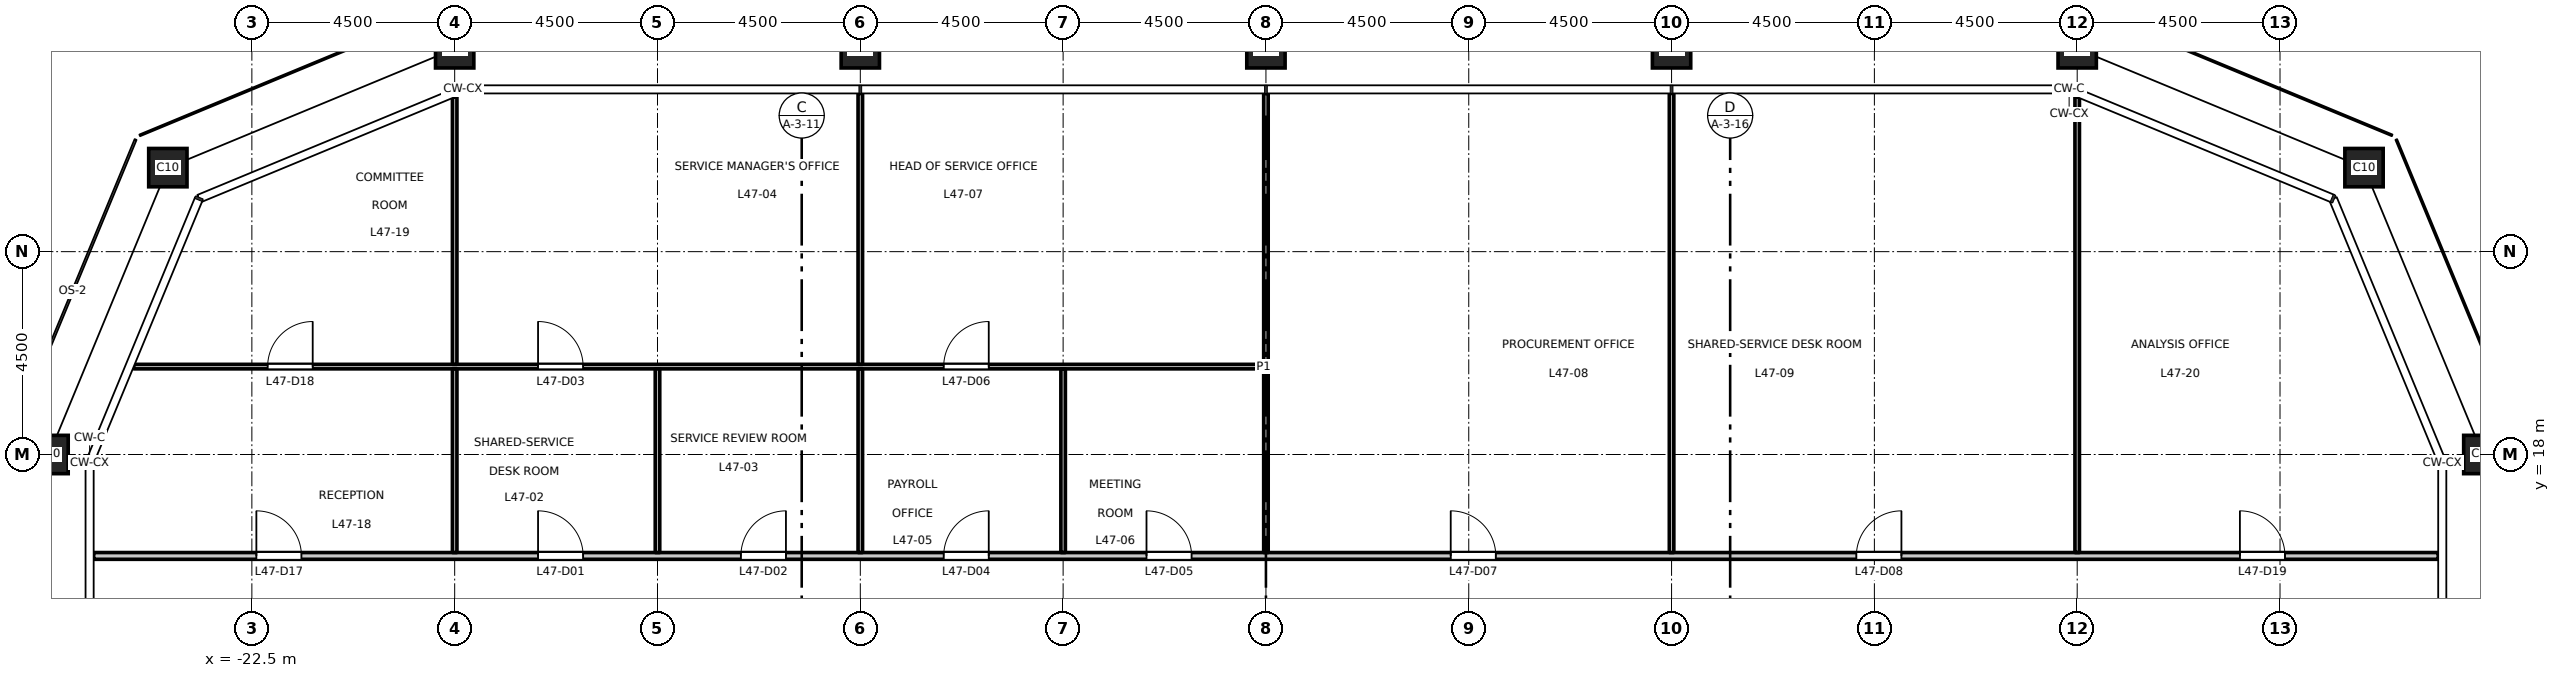
"""IFC4 building model, lengths in metres.
Left out: names, types, materials, properties, quantities, classifications, styles, units other than length and angle.
Written with IfcOpenShell. Run it as: python <this file> out.ifc"""

import sys

from ifc_helpers import new_model, si_unit, direction, frame, frame_2d, origin, origin_2d, place, context, subcontext, project, spatial, rectangle, hollow_rectangle, extrude, element, fill, save


model = new_model("IFC4")
c1 = context("Model", 3, precision=1e-05, world=origin(), true_north=direction((0.0, 1.0)))
c2 = subcontext(c1, "Body", "Model", "MODEL_VIEW")
j1 = project(units=[si_unit("LENGTHUNIT", "METRE"), si_unit("PLANEANGLEUNIT", "RADIAN")], contexts=[c1])
p1 = place(None, origin())
s1 = spatial("IfcSite", under=j1, at=p1, CompositionType="ELEMENT")
p2 = place(p1, origin())
s2 = spatial("IfcBuilding", under=s1, at=p2, CompositionType="ELEMENT")
p3 = place(p2, frame((0.0, 0.0, 219.7)))
s3 = spatial("IfcBuildingStorey", under=s2, at=p3, CompositionType="ELEMENT", Elevation=219.7)
for number, where, z_axis, x_axis in (
    (1, (27.0, 18.0, 0.0), (0.0, 0.0, 1.0), (1.0, 0.0, 0.0)),
    (2, (24.364, 24.364, 0.0), (0.0, 0.0, 1.0), (1.0, 0.0, 0.0)),
    (3, (18.0, 27.0, 0.0), (0.0, 0.0, 1.0), (1.0, 0.0, 0.0)),
    (4, (9.0, 27.0, 0.0), (0.0, 0.0, 1.0), (1.0, 0.0, 0.0)),
    (5, (0.0, 27.0, 0.0), (0.0, 0.0, 1.0), (1.0, 0.0, 0.0)),
    (6, (-9.0, 27.0, 0.0), (0.0, 0.0, 1.0), (1.0, 0.0, 0.0)),
    (7, (-18.0, 27.0, 0.0), (0.0, 0.0, 1.0), (1.0, 0.0, 0.0)),
    (8, (-24.364, 24.364, 0.0), (0.0, 0.0, 1.0), (1.0, 0.0, 0.0)),
    (9, (-27.0, 18.0, 0.0), (0.0, 0.0, 1.0), (1.0, 0.0, 0.0)),
):
    element("IfcColumn", number, at=place(p3, frame(where, z_axis=z_axis, x_axis=x_axis)), inside=s3, PredefinedType="COLUMN", context=c2, shape_type="SweptSolid", body=[
        extrude(hollow_rectangle(XDim=0.85, YDim=0.85, WallThickness=0.05, at=origin_2d()), origin(), (0.0, 0.0, 1.0), 4.5),
    ])
p4 = place(p3, frame((-26.01, 15.75, 0.0), z_axis=(0.0, 0.0, 1.0), x_axis=(1.0, 0.0, 0.0)))
e10 = element("IfcWall", 10, at=p4, inside=s3, PredefinedType="PARTITIONING", context=c2, shape_type="SweptSolid", body=[
    extrude(rectangle(XDim=52.02, YDim=0.15, at=frame_2d((26.01, 0.0))), origin(), (0.0, 0.0, 1.0), 4.35),
])
p5 = place(p4, frame((9.86, 0.0, 0.0)))
e11 = element("IfcOpeningElement", 11, at=p5, cuts=e10, PredefinedType="OPENING", context=c2, shape_type="SweptSolid", body=[
    extrude(rectangle(XDim=1.0, YDim=2.1, at=frame_2d((0.5, 1.05))), frame((0.0, 0.085, 0.0), z_axis=(0.0, -1.0, 0.0), x_axis=(1.0, 0.0, 0.0)), (0.0, 0.0, 1.0), 0.17),
])
p6 = place(p4, frame((14.36, 0.0, 0.0)))
e12 = element("IfcOpeningElement", 12, at=p6, cuts=e10, PredefinedType="OPENING", context=c2, shape_type="SweptSolid", body=[
    extrude(rectangle(XDim=1.0, YDim=2.1, at=frame_2d((0.5, 1.05))), frame((0.0, 0.085, 0.0), z_axis=(0.0, -1.0, 0.0), x_axis=(1.0, 0.0, 0.0)), (0.0, 0.0, 1.0), 0.17),
])
p7 = place(p4, frame((18.86, 0.0, 0.0)))
e13 = element("IfcOpeningElement", 13, at=p7, cuts=e10, PredefinedType="OPENING", context=c2, shape_type="SweptSolid", body=[
    extrude(rectangle(XDim=1.0, YDim=2.1, at=frame_2d((0.5, 1.05))), frame((0.0, 0.085, 0.0), z_axis=(0.0, -1.0, 0.0), x_axis=(1.0, 0.0, 0.0)), (0.0, 0.0, 1.0), 0.17),
])
p8 = place(p4, frame((23.36, 0.0, 0.0)))
e14 = element("IfcOpeningElement", 14, at=p8, cuts=e10, PredefinedType="OPENING", context=c2, shape_type="SweptSolid", body=[
    extrude(rectangle(XDim=1.0, YDim=2.1, at=frame_2d((0.5, 1.05))), frame((0.0, 0.085, 0.0), z_axis=(0.0, -1.0, 0.0), x_axis=(1.0, 0.0, 0.0)), (0.0, 0.0, 1.0), 0.17),
])
p9 = place(p4, frame((30.11, 0.0, 0.0)))
e15 = element("IfcOpeningElement", 15, at=p9, cuts=e10, PredefinedType="OPENING", context=c2, shape_type="SweptSolid", body=[
    extrude(rectangle(XDim=1.0, YDim=2.1, at=frame_2d((0.5, 1.05))), frame((0.0, 0.085, 0.0), z_axis=(0.0, -1.0, 0.0), x_axis=(1.0, 0.0, 0.0)), (0.0, 0.0, 1.0), 0.17),
])
p10 = place(p4, frame((39.11, 0.0, 0.0)))
e16 = element("IfcOpeningElement", 16, at=p10, cuts=e10, PredefinedType="OPENING", context=c2, shape_type="SweptSolid", body=[
    extrude(rectangle(XDim=1.0, YDim=2.1, at=frame_2d((0.5, 1.05))), frame((0.0, 0.085, 0.0), z_axis=(0.0, -1.0, 0.0), x_axis=(1.0, 0.0, 0.0)), (0.0, 0.0, 1.0), 0.17),
])
p11 = place(p4, frame((3.61, 0.0, 0.0)))
e17 = element("IfcOpeningElement", 17, at=p11, cuts=e10, PredefinedType="OPENING", context=c2, shape_type="SweptSolid", body=[
    extrude(rectangle(XDim=1.0, YDim=2.1, at=frame_2d((0.5, 1.05))), frame((0.0, 0.085, 0.0), z_axis=(0.0, -1.0, 0.0), x_axis=(1.0, 0.0, 0.0)), (0.0, 0.0, 1.0), 0.17),
])
p12 = place(p4, frame((47.62, 0.0, 0.0)))
e18 = element("IfcOpeningElement", 18, at=p12, cuts=e10, PredefinedType="OPENING", context=c2, shape_type="SweptSolid", body=[
    extrude(rectangle(XDim=1.0, YDim=2.1, at=frame_2d((0.5, 1.05))), frame((0.0, 0.085, 0.0), z_axis=(0.0, -1.0, 0.0), x_axis=(1.0, 0.0, 0.0)), (0.0, 0.0, 1.0), 0.17),
])
p13 = place(p3, frame((-25.121, 19.95, 0.0), z_axis=(0.0, 0.0, 1.0), x_axis=(1.0, 0.0, 0.0)))
e19 = element("IfcWall", 19, at=p13, inside=s3, PredefinedType="PARTITIONING", context=c2, shape_type="SweptSolid", body=[
    extrude(rectangle(XDim=25.071, YDim=0.1, at=frame_2d((12.536, 0.0))), origin(), (0.0, 0.0, 1.0), 4.35),
])
p14 = place(p13, frame((8.971, 0.0, 0.0)))
e20 = element("IfcOpeningElement", 20, at=p14, cuts=e19, PredefinedType="OPENING", context=c2, shape_type="SweptSolid", body=[
    extrude(rectangle(XDim=1.0, YDim=2.1, at=frame_2d((0.5, 1.05))), frame((0.0, 0.06, 0.0), z_axis=(0.0, -1.0, 0.0), x_axis=(1.0, 0.0, 0.0)), (0.0, 0.0, 1.0), 0.12),
])
p15 = place(p13, frame((17.971, 0.0, 0.0)))
e21 = element("IfcOpeningElement", 21, at=p15, cuts=e19, PredefinedType="OPENING", context=c2, shape_type="SweptSolid", body=[
    extrude(rectangle(XDim=1.0, YDim=2.1, at=frame_2d((0.5, 1.05))), frame((0.0, 0.06, 0.0), z_axis=(0.0, -1.0, 0.0), x_axis=(1.0, 0.0, 0.0)), (0.0, 0.0, 1.0), 0.12),
])
p16 = place(p13, frame((2.971, 0.0, 0.0)))
e22 = element("IfcOpeningElement", 22, at=p16, cuts=e19, PredefinedType="OPENING", context=c2, shape_type="SweptSolid", body=[
    extrude(rectangle(XDim=1.0, YDim=2.1, at=frame_2d((0.5, 1.05))), frame((0.0, 0.06, 0.0), z_axis=(0.0, -1.0, 0.0), x_axis=(1.0, 0.0, 0.0)), (0.0, 0.0, 1.0), 0.12),
])
p17 = place(p3, frame((-18.0, 15.825, 0.0), z_axis=(0.0, 0.0, 1.0), x_axis=(0.0, 1.0, 0.0)))
e23 = element("IfcWall", 23, at=p17, inside=s3, PredefinedType="PARTITIONING", context=c2, shape_type="SweptSolid", body=[
    extrude(rectangle(XDim=4.075, YDim=0.1, at=frame_2d((2.038, 0.0))), origin(), (0.0, 0.0, 1.0), 3.65),
])
p18 = place(p3, frame((-18.0, 20.0, 0.0), z_axis=(0.0, 0.0, 1.0), x_axis=(0.0, 1.0, 0.0)))
e24 = element("IfcWall", 24, at=p18, inside=s3, PredefinedType="PARTITIONING", context=c2, shape_type="SweptSolid", body=[
    extrude(rectangle(XDim=5.928, YDim=0.1, at=frame_2d((2.964, 0.0))), origin(), (0.0, 0.0, 1.0), 3.65),
])
p19 = place(p3, frame((-13.5, 15.825, 0.0), z_axis=(0.0, 0.0, 1.0), x_axis=(0.0, 1.0, 0.0)))
e25 = element("IfcWall", 25, at=p19, inside=s3, PredefinedType="PARTITIONING", context=c2, shape_type="SweptSolid", body=[
    extrude(rectangle(XDim=4.075, YDim=0.1, at=frame_2d((2.038, 0.0))), origin(), (0.0, 0.0, 1.0), 4.35),
])
p20 = place(p3, frame((-9.0, 15.825, 0.0), z_axis=(0.0, 0.0, 1.0), x_axis=(0.0, 1.0, 0.0)))
e26 = element("IfcWall", 26, at=p20, inside=s3, PredefinedType="PARTITIONING", context=c2, shape_type="SweptSolid", body=[
    extrude(rectangle(XDim=4.075, YDim=0.1, at=frame_2d((2.038, 0.0))), origin(), (0.0, 0.0, 1.0), 3.65),
])
p21 = place(p3, frame((-9.0, 20.0, 0.0), z_axis=(0.0, 0.0, 1.0), x_axis=(0.0, 1.0, 0.0)))
e27 = element("IfcWall", 27, at=p21, inside=s3, PredefinedType="PARTITIONING", context=c2, shape_type="SweptSolid", body=[
    extrude(rectangle(XDim=6.01, YDim=0.1, at=frame_2d((3.005, 0.0))), origin(), (0.0, 0.0, 1.0), 3.65),
])
p22 = place(p3, frame((-4.5, 15.825, 0.0), z_axis=(0.0, 0.0, 1.0), x_axis=(0.0, 1.0, 0.0)))
e28 = element("IfcWall", 28, at=p22, inside=s3, PredefinedType="PARTITIONING", context=c2, shape_type="SweptSolid", body=[
    extrude(rectangle(XDim=4.075, YDim=0.1, at=frame_2d((2.038, 0.0))), origin(), (0.0, 0.0, 1.0), 4.35),
])
p23 = place(p3, frame((0.0, 15.825, 0.0), z_axis=(0.0, 0.0, 1.0), x_axis=(0.0, 1.0, 0.0)))
e29 = element("IfcWall", 29, at=p23, inside=s3, PredefinedType="PARTITIONING", context=c2, shape_type="SweptSolid", body=[
    extrude(rectangle(XDim=10.185, YDim=0.1, at=frame_2d((5.093, 0.0))), origin(), (0.0, 0.0, 1.0), 3.55),
])
p24 = place(p3, frame((9.0, 15.825, 0.0), z_axis=(0.0, 0.0, 1.0), x_axis=(0.0, 1.0, 0.0)))
e30 = element("IfcWall", 30, at=p24, inside=s3, PredefinedType="PARTITIONING", context=c2, shape_type="SweptSolid", body=[
    extrude(rectangle(XDim=10.185, YDim=0.1, at=frame_2d((5.093, 0.0))), origin(), (0.0, 0.0, 1.0), 3.65),
])
p25 = place(p3, frame((18.0, 15.825, 0.0), z_axis=(0.0, 0.0, 1.0), x_axis=(0.0, 1.0, 0.0)))
e31 = element("IfcWall", 31, at=p25, inside=s3, PredefinedType="PARTITIONING", context=c2, shape_type="SweptSolid", body=[
    extrude(rectangle(XDim=10.103, YDim=0.1, at=frame_2d((5.052, 0.0))), origin(), (0.0, 0.0, 1.0), 3.65),
])
p26 = place(p5, origin())
e32 = element("IfcDoor", 32, at=p26, inside=s3, OperationType="SINGLE_SWING_LEFT", PredefinedType="DOOR", context=c2, shape_type="SweptSolid", body=[
    extrude(rectangle(XDim=1.0, YDim=2.1, at=frame_2d((0.5, 1.05))), frame((0.0, 0.025, 0.0), z_axis=(0.0, -1.0, 0.0), x_axis=(1.0, 0.0, 0.0)), (0.0, 0.0, 1.0), 0.05),
])
fill(e11, e32)
p27 = place(p6, origin())
e33 = element("IfcDoor", 33, at=p27, inside=s3, OperationType="SINGLE_SWING_RIGHT", PredefinedType="DOOR", context=c2, shape_type="SweptSolid", body=[
    extrude(rectangle(XDim=1.0, YDim=2.1, at=frame_2d((0.5, 1.05))), frame((0.0, 0.025, 0.0), z_axis=(0.0, -1.0, 0.0), x_axis=(1.0, 0.0, 0.0)), (0.0, 0.0, 1.0), 0.05),
])
fill(e12, e33)
p28 = place(p14, origin())
e34 = element("IfcDoor", 34, at=p28, inside=s3, OperationType="SINGLE_SWING_LEFT", PredefinedType="DOOR", context=c2, shape_type="SweptSolid", body=[
    extrude(rectangle(XDim=1.0, YDim=2.1, at=frame_2d((0.5, 1.05))), frame((0.0, 0.025, 0.0), z_axis=(0.0, -1.0, 0.0), x_axis=(1.0, 0.0, 0.0)), (0.0, 0.0, 1.0), 0.05),
])
fill(e20, e34)
p29 = place(p7, origin())
e35 = element("IfcDoor", 35, at=p29, inside=s3, OperationType="SINGLE_SWING_RIGHT", PredefinedType="DOOR", context=c2, shape_type="SweptSolid", body=[
    extrude(rectangle(XDim=1.0, YDim=2.1, at=frame_2d((0.5, 1.05))), frame((0.0, 0.025, 0.0), z_axis=(0.0, -1.0, 0.0), x_axis=(1.0, 0.0, 0.0)), (0.0, 0.0, 1.0), 0.05),
])
fill(e13, e35)
p30 = place(p8, origin())
e36 = element("IfcDoor", 36, at=p30, inside=s3, OperationType="SINGLE_SWING_LEFT", PredefinedType="DOOR", context=c2, shape_type="SweptSolid", body=[
    extrude(rectangle(XDim=1.0, YDim=2.1, at=frame_2d((0.5, 1.05))), frame((0.0, 0.025, 0.0), z_axis=(0.0, -1.0, 0.0), x_axis=(1.0, 0.0, 0.0)), (0.0, 0.0, 1.0), 0.05),
])
fill(e14, e36)
p31 = place(p15, origin())
e37 = element("IfcDoor", 37, at=p31, inside=s3, OperationType="SINGLE_SWING_RIGHT", PredefinedType="DOOR", context=c2, shape_type="SweptSolid", body=[
    extrude(rectangle(XDim=1.0, YDim=2.1, at=frame_2d((0.5, 1.05))), frame((0.0, 0.025, 0.0), z_axis=(0.0, -1.0, 0.0), x_axis=(1.0, 0.0, 0.0)), (0.0, 0.0, 1.0), 0.05),
])
fill(e21, e37)
p32 = place(p9, origin())
e38 = element("IfcDoor", 38, at=p32, inside=s3, OperationType="SINGLE_SWING_LEFT", PredefinedType="DOOR", context=c2, shape_type="SweptSolid", body=[
    extrude(rectangle(XDim=1.0, YDim=2.1, at=frame_2d((0.5, 1.05))), frame((0.0, 0.025, 0.0), z_axis=(0.0, -1.0, 0.0), x_axis=(1.0, 0.0, 0.0)), (0.0, 0.0, 1.0), 0.05),
])
fill(e15, e38)
p33 = place(p10, origin())
e39 = element("IfcDoor", 39, at=p33, inside=s3, OperationType="SINGLE_SWING_RIGHT", PredefinedType="DOOR", context=c2, shape_type="SweptSolid", body=[
    extrude(rectangle(XDim=1.0, YDim=2.1, at=frame_2d((0.5, 1.05))), frame((0.0, 0.025, 0.0), z_axis=(0.0, -1.0, 0.0), x_axis=(1.0, 0.0, 0.0)), (0.0, 0.0, 1.0), 0.05),
])
fill(e16, e39)
p34 = place(p11, origin())
e40 = element("IfcDoor", 40, at=p34, inside=s3, OperationType="SINGLE_SWING_LEFT", PredefinedType="DOOR", context=c2, shape_type="SweptSolid", body=[
    extrude(rectangle(XDim=1.0, YDim=2.1, at=frame_2d((0.5, 1.05))), frame((0.0, 0.025, 0.0), z_axis=(0.0, -1.0, 0.0), x_axis=(1.0, 0.0, 0.0)), (0.0, 0.0, 1.0), 0.05),
])
fill(e17, e40)
p35 = place(p16, origin())
e41 = element("IfcDoor", 41, at=p35, inside=s3, OperationType="SINGLE_SWING_RIGHT", PredefinedType="DOOR", context=c2, shape_type="SweptSolid", body=[
    extrude(rectangle(XDim=1.0, YDim=2.1, at=frame_2d((0.5, 1.05))), frame((0.0, 0.025, 0.0), z_axis=(0.0, -1.0, 0.0), x_axis=(1.0, 0.0, 0.0)), (0.0, 0.0, 1.0), 0.05),
])
fill(e22, e41)
p36 = place(p12, origin())
e42 = element("IfcDoor", 42, at=p36, inside=s3, OperationType="SINGLE_SWING_LEFT", PredefinedType="DOOR", context=c2, shape_type="SweptSolid", body=[
    extrude(rectangle(XDim=1.0, YDim=2.1, at=frame_2d((0.5, 1.05))), frame((0.0, 0.025, 0.0), z_axis=(0.0, -1.0, 0.0), x_axis=(1.0, 0.0, 0.0)), (0.0, 0.0, 1.0), 0.05),
])
fill(e18, e42)
save(model, sys.argv[1])
